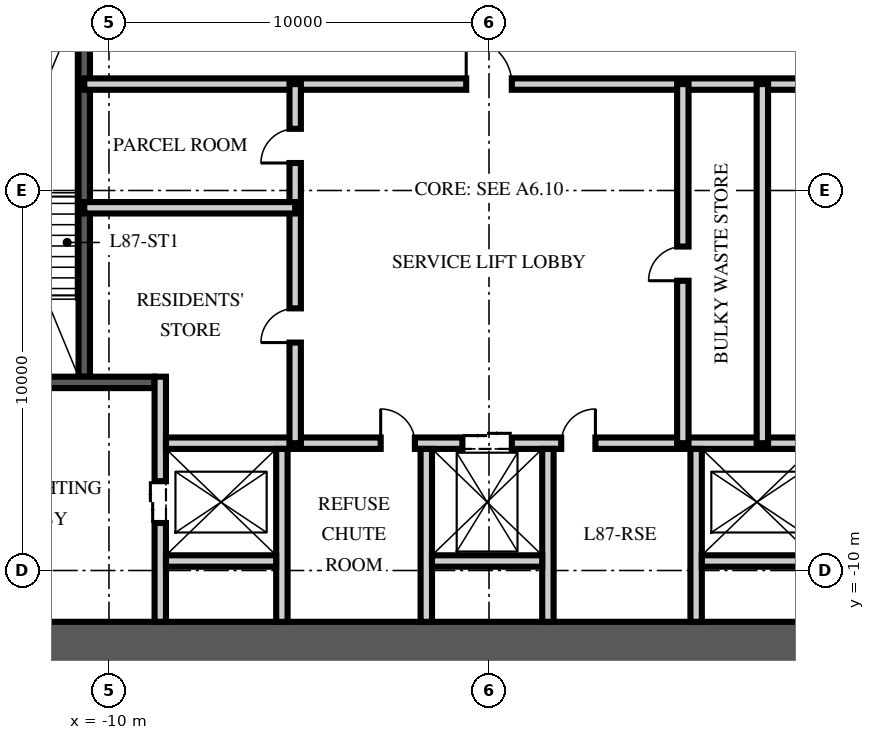
"""IFC4 building model, lengths in metres.
Left out: names, types, materials, properties, quantities, classifications, styles, units other than length and angle.
Written with IfcOpenShell. Run it as: python <this file> out.ifc"""

import sys

from ifc_helpers import new_model, si_unit, direction, frame, frame_2d, origin, place, context, subcontext, project, spatial, rectangle, extrude, element, fill, save


model = new_model("IFC4")
c1 = context("Model", 3, precision=1e-05, world=origin(), true_north=direction((0.0, 1.0)))
c2 = subcontext(c1, "Body", "Model", "MODEL_VIEW")
j1 = project(units=[si_unit("LENGTHUNIT", "METRE"), si_unit("PLANEANGLEUNIT", "RADIAN")], contexts=[c1])
p1 = place(None, origin())
s1 = spatial("IfcSite", under=j1, at=p1, CompositionType="ELEMENT")
p2 = place(p1, origin())
s2 = spatial("IfcBuilding", under=s1, at=p2, CompositionType="ELEMENT")
p3 = place(p2, frame((0.0, 0.0, 345.75)))
s3 = spatial("IfcBuildingStorey", under=s2, at=p3, CompositionType="ELEMENT", Elevation=345.75)
p4 = place(p3, frame((-15.5, -12.0, -0.25), z_axis=(0.0, 0.0, 1.0), x_axis=(1.0, 0.0, 0.0)))
e1 = element("IfcWall", 1, at=p4, inside=s3, PredefinedType="SHEAR", context=c2, shape_type="SweptSolid", body=[
    extrude(rectangle(XDim=31.0, YDim=1.3, at=frame_2d((15.5, 0.0))), origin(), (0.0, 0.0, 1.0), 3.75),
])
p5 = place(p3, frame((-10.65, -4.9, 0.0), z_axis=(0.0, 0.0, 1.0), x_axis=(0.0, 1.0, 0.0)))
e2 = element("IfcWall", 2, at=p5, inside=s3, PredefinedType="SOLIDWALL", context=c2, shape_type="SweptSolid", body=[
    extrude(rectangle(XDim=10.1, YDim=0.3, at=frame_2d((5.05, 0.0))), origin(), (0.0, 0.0, 1.0), 3.5),
])
p6 = place(p3, frame((-14.85, -5.05, 0.0), z_axis=(0.0, 0.0, 1.0), x_axis=(1.0, 0.0, 0.0)))
e3 = element("IfcWall", 3, at=p6, inside=s3, PredefinedType="SOLIDWALL", context=c2, shape_type="SweptSolid", body=[
    extrude(rectangle(XDim=6.05, YDim=0.3, at=frame_2d((3.025, 0.0))), origin(), (0.0, 0.0, 1.0), 3.5),
])
p7 = place(p6, frame((1.425, 0.0, 0.0)))
e4 = element("IfcOpeningElement", 4, at=p7, cuts=e3, PredefinedType="OPENING", context=c2, shape_type="SweptSolid", body=[
    extrude(rectangle(XDim=1.2, YDim=2.1, at=frame_2d((0.6, 1.05))), frame((0.0, 0.16, 0.0), z_axis=(0.0, -1.0, 0.0), x_axis=(1.0, 0.0, 0.0)), (0.0, 0.0, 1.0), 0.32),
])
p8 = place(p3, frame((-8.65, -11.35, 0.0), z_axis=(0.0, 0.0, 1.0), x_axis=(0.0, 1.0, 0.0)))
e5 = element("IfcWall", 5, at=p8, inside=s3, PredefinedType="PARTITIONING", context=c2, shape_type="SweptSolid", body=[
    extrude(rectangle(XDim=6.45, YDim=0.3, at=frame_2d((3.225, 0.0))), origin(), (0.0, 0.0, 1.0), 3.5),
])
p9 = place(p8, frame((2.6, 0.0, 0.0)))
e6 = element("IfcOpeningElement", 6, at=p9, cuts=e5, PredefinedType="OPENING", context=c2, shape_type="SweptSolid", body=[
    extrude(rectangle(XDim=1.1, YDim=2.1, at=frame_2d((0.55, 1.05))), frame((0.0, 0.16, 0.0), z_axis=(0.0, -1.0, 0.0), x_axis=(1.0, 0.0, 0.0)), (0.0, 0.0, 1.0), 0.32),
])
p10 = place(p3, frame((-8.5, -6.65, 0.0), z_axis=(0.0, 0.0, 1.0), x_axis=(1.0, 0.0, 0.0)))
e7 = element("IfcWall", 7, at=p10, inside=s3, PredefinedType="PARTITIONING", context=c2, shape_type="SweptSolid", body=[
    extrude(rectangle(XDim=17.0, YDim=0.3, at=frame_2d((8.5, 0.0))), origin(), (0.0, 0.0, 1.0), 3.5),
])
p11 = place(p10, frame((7.8, 0.0, 0.0)))
e8 = element("IfcOpeningElement", 8, at=p11, cuts=e7, PredefinedType="OPENING", context=c2, shape_type="SweptSolid", body=[
    extrude(rectangle(XDim=1.3, YDim=2.4, at=frame_2d((0.65, 1.2))), frame((0.0, 0.16, 0.0), z_axis=(0.0, -1.0, 0.0), x_axis=(1.0, 0.0, 0.0)), (0.0, 0.0, 1.0), 0.32),
])
p12 = place(p10, frame((5.65, 0.0, 0.0)))
e9 = element("IfcOpeningElement", 9, at=p12, cuts=e7, PredefinedType="OPENING", context=c2, shape_type="SweptSolid", body=[
    extrude(rectangle(XDim=0.9, YDim=2.1, at=frame_2d((0.45, 1.05))), frame((0.0, 0.16, 0.0), z_axis=(0.0, -1.0, 0.0), x_axis=(1.0, 0.0, 0.0)), (0.0, 0.0, 1.0), 0.32),
])
p13 = place(p10, frame((10.4, 0.0, 0.0)))
e10 = element("IfcOpeningElement", 10, at=p13, cuts=e7, PredefinedType="OPENING", context=c2, shape_type="SweptSolid", body=[
    extrude(rectangle(XDim=0.9, YDim=2.1, at=frame_2d((0.45, 1.05))), frame((0.0, 0.16, 0.0), z_axis=(0.0, -1.0, 0.0), x_axis=(1.0, 0.0, 0.0)), (0.0, 0.0, 1.0), 0.32),
])
for number, where, z_axis, x_axis in (
    (11, (-5.45, -11.35, 0.0), (0.0, 0.0, 1.0), (0.0, 1.0, 0.0)),
    (12, (-1.65, -11.35, 0.0), (0.0, 0.0, 1.0), (0.0, 1.0, 0.0)),
    (13, (1.55, -11.35, 0.0), (0.0, 0.0, 1.0), (0.0, 1.0, 0.0)),
    (14, (5.45, -11.35, 0.0), (0.0, 0.0, 1.0), (0.0, 1.0, 0.0)),
):
    element("IfcWall", number, at=place(p3, frame(where, z_axis=z_axis, x_axis=x_axis)), inside=s3, PredefinedType="PARTITIONING", context=c2, shape_type="SweptSolid", body=[
        extrude(rectangle(XDim=4.55, YDim=0.3, at=frame_2d((2.275, 0.0))), origin(), (0.0, 0.0, 1.0), 3.5),
    ])
for number, where, z_axis, x_axis in (
    (15, (-8.5, -9.75, 0.0), (0.0, 0.0, 1.0), (1.0, 0.0, 0.0)),
    (16, (-1.5, -9.75, 0.0), (0.0, 0.0, 1.0), (1.0, 0.0, 0.0)),
    (17, (5.6, -9.75, 0.0), (0.0, 0.0, 1.0), (1.0, 0.0, 0.0)),
):
    element("IfcWall", number, at=place(p3, frame(where, z_axis=z_axis, x_axis=x_axis)), inside=s3, PredefinedType="PARTITIONING", context=c2, shape_type="SweptSolid", body=[
        extrude(rectangle(XDim=2.9, YDim=0.3, at=frame_2d((1.45, 0.0))), origin(), (0.0, 0.0, 1.0), 3.5),
    ])
p14 = place(p3, frame((-10.65, 2.8, 0.0), z_axis=(0.0, 0.0, 1.0), x_axis=(1.0, 0.0, 0.0)))
e18 = element("IfcWall", 18, at=p14, inside=s3, PredefinedType="PARTITIONING", context=c2, shape_type="SweptSolid", body=[
    extrude(rectangle(XDim=21.3, YDim=0.3, at=frame_2d((10.65, 0.0))), origin(), (0.0, 0.0, 1.0), 3.5),
])
p15 = place(p14, frame((10.05, 0.0, 0.0)))
e19 = element("IfcOpeningElement", 19, at=p15, cuts=e18, PredefinedType="OPENING", context=c2, shape_type="SweptSolid", body=[
    extrude(rectangle(XDim=1.2, YDim=2.1, at=frame_2d((0.6, 1.05))), frame((0.0, 0.16, 0.0), z_axis=(0.0, -1.0, 0.0), x_axis=(1.0, 0.0, 0.0)), (0.0, 0.0, 1.0), 0.32),
])
p16 = place(p14, frame((19.121, 0.0, 0.0)))
e20 = element("IfcOpeningElement", 20, at=p16, cuts=e18, PredefinedType="OPENING", context=c2, shape_type="SweptSolid", body=[
    extrude(rectangle(XDim=0.9, YDim=2.1, at=frame_2d((0.45, 1.05))), frame((0.0, 0.16, 0.0), z_axis=(0.0, -1.0, 0.0), x_axis=(1.0, 0.0, 0.0)), (0.0, 0.0, 1.0), 0.32),
])
p17 = place(p3, frame((-5.1, -6.65, 0.0), z_axis=(0.0, 0.0, 1.0), x_axis=(0.0, 1.0, 0.0)))
e21 = element("IfcWall", 21, at=p17, inside=s3, PredefinedType="PARTITIONING", context=c2, shape_type="SweptSolid", body=[
    extrude(rectangle(XDim=9.45, YDim=0.3, at=frame_2d((4.725, 0.0))), origin(), (0.0, 0.0, 1.0), 3.5),
])
p18 = place(p17, frame((2.648, 0.0, 0.0)))
e22 = element("IfcOpeningElement", 22, at=p18, cuts=e21, PredefinedType="OPENING", context=c2, shape_type="SweptSolid", body=[
    extrude(rectangle(XDim=0.9, YDim=2.1, at=frame_2d((0.45, 1.05))), frame((0.0, 0.16, 0.0), z_axis=(0.0, -1.0, 0.0), x_axis=(1.0, 0.0, 0.0)), (0.0, 0.0, 1.0), 0.32),
])
p19 = place(p17, frame((7.373, 0.0, 0.0)))
e23 = element("IfcOpeningElement", 23, at=p19, cuts=e21, PredefinedType="OPENING", context=c2, shape_type="SweptSolid", body=[
    extrude(rectangle(XDim=0.9, YDim=2.1, at=frame_2d((0.45, 1.05))), frame((0.0, 0.16, 0.0), z_axis=(0.0, -1.0, 0.0), x_axis=(1.0, 0.0, 0.0)), (0.0, 0.0, 1.0), 0.32),
])
p20 = place(p3, frame((5.1, -6.65, 0.0), z_axis=(0.0, 0.0, 1.0), x_axis=(0.0, 1.0, 0.0)))
e24 = element("IfcWall", 24, at=p20, inside=s3, PredefinedType="PARTITIONING", context=c2, shape_type="SweptSolid", body=[
    extrude(rectangle(XDim=9.45, YDim=0.3, at=frame_2d((4.725, 0.0))), origin(), (0.0, 0.0, 1.0), 3.5),
])
p21 = place(p20, frame((4.275, 0.0, 0.0)))
e25 = element("IfcOpeningElement", 25, at=p21, cuts=e24, PredefinedType="OPENING", context=c2, shape_type="SweptSolid", body=[
    extrude(rectangle(XDim=0.9, YDim=2.1, at=frame_2d((0.45, 1.05))), frame((0.0, 0.16, 0.0), z_axis=(0.0, -1.0, 0.0), x_axis=(1.0, 0.0, 0.0)), (0.0, 0.0, 1.0), 0.32),
])
p22 = place(p3, frame((-10.65, -0.455, 0.0), z_axis=(0.0, 0.0, 1.0), x_axis=(1.0, 0.0, 0.0)))
e26 = element("IfcWall", 26, at=p22, inside=s3, PredefinedType="PARTITIONING", context=c2, shape_type="SweptSolid", body=[
    extrude(rectangle(XDim=5.55, YDim=0.3, at=frame_2d((2.775, 0.0))), origin(), (0.0, 0.0, 1.0), 3.5),
])
p23 = place(p3, frame((7.193, -6.65, 0.0), z_axis=(0.0, 0.0, 1.0), x_axis=(0.0, 1.0, 0.0)))
e27 = element("IfcWall", 27, at=p23, inside=s3, PredefinedType="PARTITIONING", context=c2, shape_type="SweptSolid", body=[
    extrude(rectangle(XDim=9.45, YDim=0.3, at=frame_2d((4.725, 0.0))), origin(), (0.0, 0.0, 1.0), 3.5),
])
p24 = place(p9, origin())
e28 = element("IfcDoor", 28, at=p24, inside=s3, OperationType="DOUBLE_DOOR_SLIDING", PredefinedType="DOOR", context=c2, shape_type="SweptSolid", body=[
    extrude(rectangle(XDim=1.1, YDim=2.1, at=frame_2d((0.55, 1.05))), frame((0.0, 0.025, 0.0), z_axis=(0.0, -1.0, 0.0), x_axis=(1.0, 0.0, 0.0)), (0.0, 0.0, 1.0), 0.05),
])
fill(e6, e28)
p25 = place(p11, origin())
e29 = element("IfcDoor", 29, at=p25, inside=s3, OperationType="DOUBLE_DOOR_SLIDING", PredefinedType="DOOR", context=c2, shape_type="SweptSolid", body=[
    extrude(rectangle(XDim=1.3, YDim=2.4, at=frame_2d((0.65, 1.2))), frame((0.0, 0.025, 0.0), z_axis=(0.0, -1.0, 0.0), x_axis=(1.0, 0.0, 0.0)), (0.0, 0.0, 1.0), 0.05),
])
fill(e8, e29)
p26 = place(p15, origin())
e30 = element("IfcDoor", 30, at=p26, inside=s3, OperationType="SINGLE_SWING_LEFT", PredefinedType="DOOR", context=c2, shape_type="SweptSolid", body=[
    extrude(rectangle(XDim=1.2, YDim=2.1, at=frame_2d((0.6, 1.05))), frame((0.0, 0.025, 0.0), z_axis=(0.0, -1.0, 0.0), x_axis=(1.0, 0.0, 0.0)), (0.0, 0.0, 1.0), 0.05),
])
fill(e19, e30)
p27 = place(p12, origin())
e31 = element("IfcDoor", 31, at=p27, inside=s3, OperationType="SINGLE_SWING_LEFT", PredefinedType="DOOR", context=c2, shape_type="SweptSolid", body=[
    extrude(rectangle(XDim=0.9, YDim=2.1, at=frame_2d((0.45, 1.05))), frame((0.0, 0.025, 0.0), z_axis=(0.0, -1.0, 0.0), x_axis=(1.0, 0.0, 0.0)), (0.0, 0.0, 1.0), 0.05),
])
fill(e9, e31)
p28 = place(p13, origin())
e32 = element("IfcDoor", 32, at=p28, inside=s3, OperationType="SINGLE_SWING_RIGHT", PredefinedType="DOOR", context=c2, shape_type="SweptSolid", body=[
    extrude(rectangle(XDim=0.9, YDim=2.1, at=frame_2d((0.45, 1.05))), frame((0.0, 0.025, 0.0), z_axis=(0.0, -1.0, 0.0), x_axis=(1.0, 0.0, 0.0)), (0.0, 0.0, 1.0), 0.05),
])
fill(e10, e32)
p29 = place(p18, origin())
e33 = element("IfcDoor", 33, at=p29, inside=s3, OperationType="SINGLE_SWING_LEFT", PredefinedType="DOOR", context=c2, shape_type="SweptSolid", body=[
    extrude(rectangle(XDim=0.9, YDim=2.1, at=frame_2d((0.45, 1.05))), frame((0.0, 0.025, 0.0), z_axis=(0.0, -1.0, 0.0), x_axis=(1.0, 0.0, 0.0)), (0.0, 0.0, 1.0), 0.05),
])
fill(e22, e33)
p30 = place(p19, origin())
e34 = element("IfcDoor", 34, at=p30, inside=s3, OperationType="SINGLE_SWING_LEFT", PredefinedType="DOOR", context=c2, shape_type="SweptSolid", body=[
    extrude(rectangle(XDim=0.9, YDim=2.1, at=frame_2d((0.45, 1.05))), frame((0.0, 0.025, 0.0), z_axis=(0.0, -1.0, 0.0), x_axis=(1.0, 0.0, 0.0)), (0.0, 0.0, 1.0), 0.05),
])
fill(e23, e34)
p31 = place(p21, origin())
e35 = element("IfcDoor", 35, at=p31, inside=s3, OperationType="SINGLE_SWING_LEFT", PredefinedType="DOOR", context=c2, shape_type="SweptSolid", body=[
    extrude(rectangle(XDim=0.9, YDim=2.1, at=frame_2d((0.45, 1.05))), frame((0.0, 0.025, 0.0), z_axis=(0.0, -1.0, 0.0), x_axis=(1.0, 0.0, 0.0)), (0.0, 0.0, 1.0), 0.05),
])
fill(e25, e35)
save(model, sys.argv[1])
